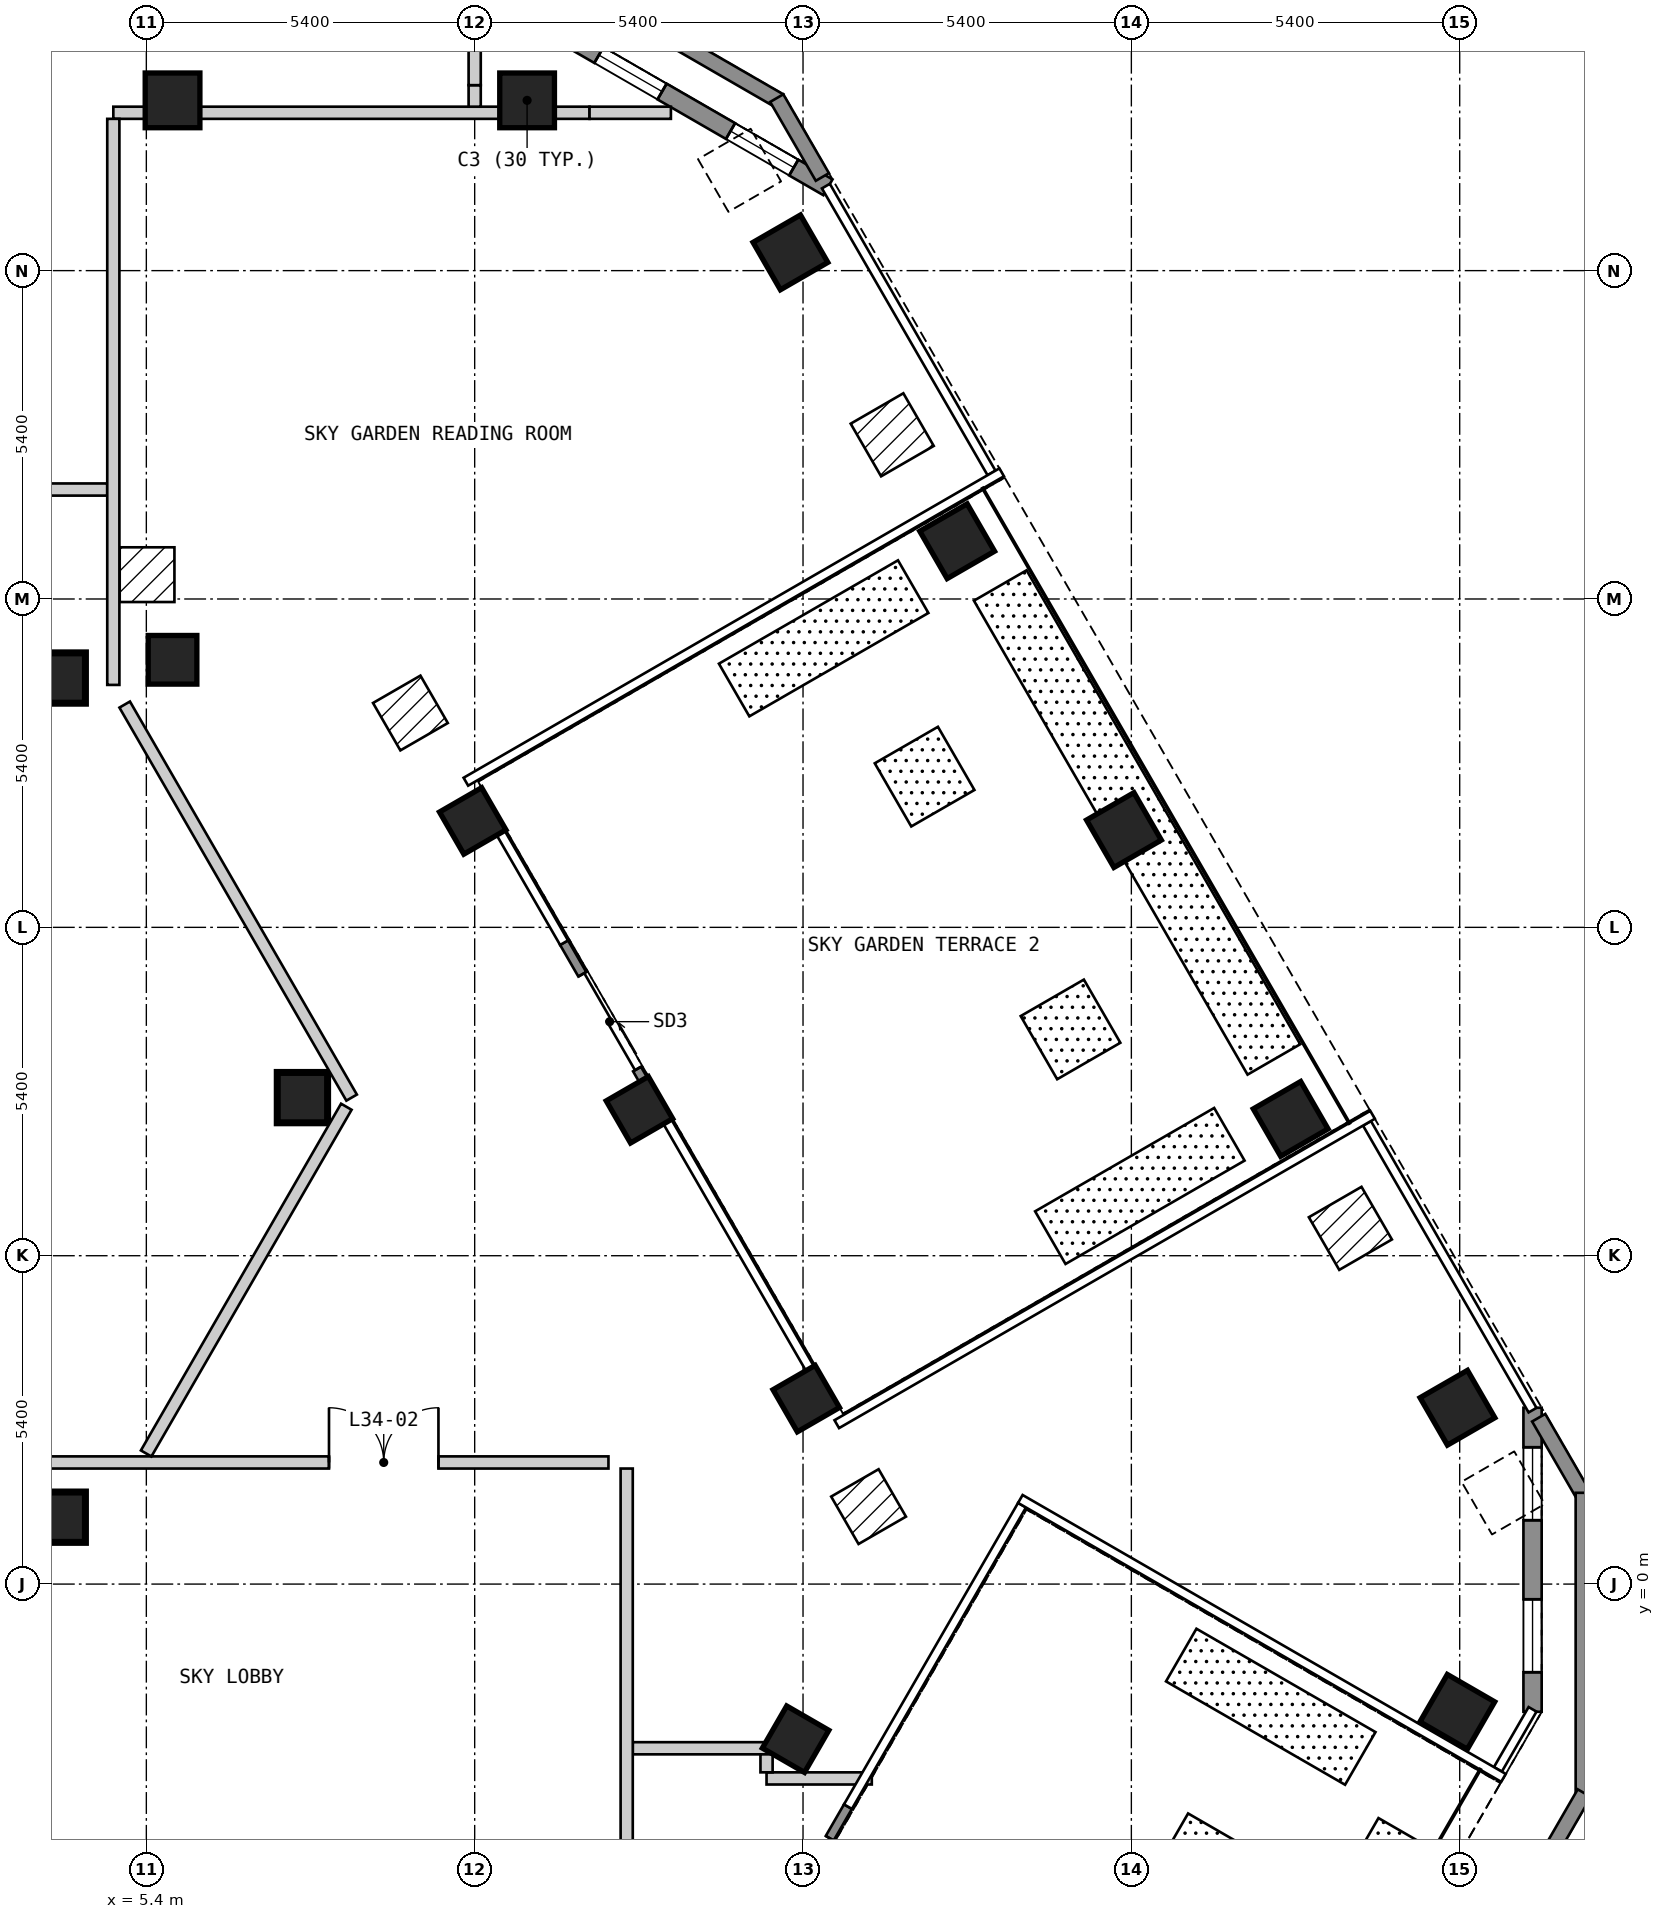
"""IFC4 building model, lengths in metres.
Left out: names, types, materials, properties, quantities, classifications, styles, units other than length and angle.
Written with IfcOpenShell. Run it as: python <this file> out.ifc"""

import sys

from ifc_helpers import new_model, si_unit, direction, frame, frame_2d, origin, origin_2d, place, context, subcontext, project, spatial, polyline, rectangle, outline, extrude, element, fill, save


model = new_model("IFC4")
c1 = context("Model", 3, precision=1e-05, world=origin(), true_north=direction((0.0, 1.0)))
c2 = subcontext(c1, "Body", "Model", "MODEL_VIEW")
j1 = project(units=[si_unit("LENGTHUNIT", "METRE"), si_unit("PLANEANGLEUNIT", "RADIAN")], contexts=[c1])
p1 = place(None, origin())
s1 = spatial("IfcSite", under=j1, at=p1, CompositionType="ELEMENT")
p2 = place(p1, origin())
s2 = spatial("IfcBuilding", under=s1, at=p2, CompositionType="ELEMENT")
p3 = place(p2, frame((0.0, 0.0, 111.6)))
s3 = spatial("IfcBuildingStorey", under=s2, at=p3, CompositionType="ELEMENT", Elevation=111.6)
for number, where, z_axis, x_axis in (
    (1, (11.662, 24.4, 0.0), (0.0, 0.0, 1.0), (-1.0, 0.0, 0.0)),
    (2, (5.831, 24.4, 0.0), (0.0, 0.0, 1.0), (-1.0, 0.0, 0.0)),
    (3, (26.961, -2.101, 0.0), (0.0, 0.0, 1.0), (0.5, 0.866, 0.0)),
    (4, (26.963, 2.9, 0.0), (0.0, 0.0, 1.0), (-0.5, 0.866, 0.0)),
    (5, (24.22, 7.65, 0.0), (0.0, 0.0, 1.0), (-0.5, 0.866, 0.0)),
    (6, (21.478, 12.4, 0.0), (0.0, 0.0, 1.0), (-0.5, 0.866, 0.0)),
    (7, (18.735, 17.15, 0.0), (0.0, 0.0, 1.0), (-0.5, 0.866, 0.0)),
    (8, (15.993, 21.9, 0.0), (0.0, 0.0, 1.0), (-0.5, 0.866, 0.0)),
):
    element("IfcColumn", number, at=place(p3, frame(where, z_axis=z_axis, x_axis=x_axis)), inside=s3, PredefinedType="COLUMN", context=c2, shape_type="SweptSolid", body=[
        extrude(rectangle(XDim=0.9, YDim=0.9, at=origin_2d()), origin(), (0.0, 0.0, 1.0), 6.0),
    ])
for number, where, z_axis, x_axis in (
    (9, (16.078, -2.551, 0.0), (0.0, 0.0, 1.0), (0.5, 0.866, 0.0)),
    (10, (16.253, 3.05, 0.0), (0.0, 0.0, 1.0), (-0.5, 0.866, 0.0)),
    (11, (3.984, 1.1, 0.0), (0.0, 0.0, 1.0), (1.0, 0.0, 0.0)),
    (12, (13.51, 7.8, 0.0), (0.0, 0.0, 1.0), (-0.5, 0.866, 0.0)),
    (13, (7.967, 8.0, 0.0), (0.0, 0.0, 1.0), (1.0, 0.0, 0.0)),
    (14, (10.768, 12.55, 0.0), (0.0, 0.0, 1.0), (-0.5, 0.866, 0.0)),
    (15, (5.831, 15.2, 0.0), (0.0, 0.0, 1.0), (-1.0, 0.0, 0.0)),
    (16, (3.984, 14.9, 0.0), (0.0, 0.0, 1.0), (1.0, 0.0, 0.0)),
):
    element("IfcColumn", number, at=place(p3, frame(where, z_axis=z_axis, x_axis=x_axis)), inside=s3, PredefinedType="COLUMN", context=c2, shape_type="SweptSolid", body=[
        extrude(rectangle(XDim=0.8, YDim=0.8, at=origin_2d()), origin(), (0.0, 0.0, 1.0), 6.0),
    ])
p4 = place(p3, frame((28.198, -2.1, 0.0), z_axis=(0.0, 0.0, 1.0), x_axis=(0.0, 1.0, 0.0)))
e17 = element("IfcWall", 17, at=p4, inside=s3, PredefinedType="SOLIDWALL", context=c2, shape_type="SweptSolid", body=[
    extrude(outline(polyline([(0.0, -0.15), (5.0, -0.15), (4.92, 0.15), (0.08, 0.15), (0.0, -0.15)])), origin(), (0.0, 0.0, 1.0), 5.7),
])
p5 = place(p4, frame((0.65, 0.0, 0.15)))
e18 = element("IfcOpeningElement", 18, at=p5, cuts=e17, PredefinedType="OPENING", context=c2, shape_type="SweptSolid", body=[
    extrude(rectangle(XDim=1.2, YDim=2.1, at=frame_2d((0.6, 1.05))), frame((0.0, 0.16, 0.0), z_axis=(0.0, -1.0, 0.0), x_axis=(1.0, 0.0, 0.0)), (0.0, 0.0, 1.0), 0.32),
])
p6 = place(p4, frame((3.15, 0.0, 0.15)))
e19 = element("IfcOpeningElement", 19, at=p6, cuts=e17, PredefinedType="OPENING", context=c2, shape_type="SweptSolid", body=[
    extrude(rectangle(XDim=1.2, YDim=2.1, at=frame_2d((0.6, 1.05))), frame((0.0, 0.16, 0.0), z_axis=(0.0, -1.0, 0.0), x_axis=(1.0, 0.0, 0.0)), (0.0, 0.0, 1.0), 0.32),
])
p7 = place(p3, frame((16.61, 22.97, 0.0), z_axis=(0.0, 0.0, 1.0), x_axis=(-0.866022959057, 0.500004234368, 0.0)))
e20 = element("IfcWall", 20, at=p7, inside=s3, PredefinedType="SOLIDWALL", context=c2, shape_type="SweptSolid", body=[
    extrude(outline(polyline([(0.0, -0.15), (5.0, -0.15), (4.92, 0.15), (0.08, 0.15), (0.0, -0.15)])), origin(), (0.0, 0.0, 1.0), 5.7),
])
p8 = place(p7, frame((0.65, 0.0, 0.15)))
e21 = element("IfcOpeningElement", 21, at=p8, cuts=e20, PredefinedType="OPENING", context=c2, shape_type="SweptSolid", body=[
    extrude(rectangle(XDim=1.2, YDim=2.1, at=frame_2d((0.6, 1.05))), frame((0.0, 0.16, 0.0), z_axis=(0.0, -1.0, 0.0), x_axis=(1.0, 0.0, 0.0)), (0.0, 0.0, 1.0), 0.32),
])
p9 = place(p7, frame((3.15, 0.0, 0.15)))
e22 = element("IfcOpeningElement", 22, at=p9, cuts=e20, PredefinedType="OPENING", context=c2, shape_type="SweptSolid", body=[
    extrude(rectangle(XDim=1.2, YDim=2.1, at=frame_2d((0.6, 1.05))), frame((0.0, 0.16, 0.0), z_axis=(0.0, -1.0, 0.0), x_axis=(1.0, 0.0, 0.0)), (0.0, 0.0, 1.0), 0.32),
])
p10 = place(p3, frame((13.77, 7.95, 0.0), z_axis=(0.0, 0.0, 1.0), x_axis=(-0.499990139034, 0.866031096941, 0.0)))
e23 = element("IfcWall", 23, at=p10, inside=s3, PredefinedType="SOLIDWALL", context=c2, shape_type="SweptSolid", body=[
    extrude(rectangle(XDim=3.0, YDim=0.15, at=frame_2d((1.5, 0.0))), origin(), (0.0, 0.0, 1.0), 5.7),
])
p11 = place(p10, frame((0.6, 0.0, 0.0)))
e24 = element("IfcOpeningElement", 24, at=p11, cuts=e23, PredefinedType="OPENING", context=c2, shape_type="SweptSolid", body=[
    extrude(rectangle(XDim=1.8, YDim=2.4, at=frame_2d((0.9, 1.2))), frame((0.0, 0.085, 0.0), z_axis=(0.0, -1.0, 0.0), x_axis=(1.0, 0.0, 0.0)), (0.0, 0.0, 1.0), 0.17),
])
p12 = place(p3, frame((15.439, -6.258, 0.0), z_axis=(0.0, 0.0, 1.0), x_axis=(0.499990139034, 0.866031096941, 0.0)))
e25 = element("IfcWall", 25, at=p12, inside=s3, PredefinedType="SOLIDWALL", context=c2, shape_type="SweptSolid", body=[
    extrude(rectangle(XDim=3.0, YDim=0.15, at=frame_2d((1.5, 0.0))), origin(), (0.0, 0.0, 1.0), 5.7),
])
p13 = place(p12, frame((0.6, 0.0, 0.0)))
e26 = element("IfcOpeningElement", 26, at=p13, cuts=e25, PredefinedType="OPENING", context=c2, shape_type="SweptSolid", body=[
    extrude(rectangle(XDim=1.8, YDim=2.4, at=frame_2d((0.9, 1.2))), frame((0.0, 0.085, 0.0), z_axis=(0.0, -1.0, 0.0), x_axis=(1.0, 0.0, 0.0)), (0.0, 0.0, 1.0), 0.17),
])
p14 = place(p3, frame((28.299, 2.736, 0.0), z_axis=(0.0, 0.0, 1.0), x_axis=(0.500272171574, -0.865868208418, 0.0)))
e27 = element("IfcWall", 27, at=p14, inside=s3, PredefinedType="PARAPET", context=c2, shape_type="SweptSolid", body=[
    extrude(outline(polyline([(0.0, -0.125), (1.432, -0.125), (1.499, 0.125), (0.0, 0.125), (0.0, -0.125)])), origin(), (0.0, 0.0, 1.0), 1.6),
])
p15 = place(p3, frame((29.032, 1.501, 0.0), z_axis=(0.0, 0.0, 1.0), x_axis=(0.0, -1.0, 0.0)))
e28 = element("IfcWall", 28, at=p15, inside=s3, PredefinedType="PARAPET", context=c2, shape_type="SweptSolid", body=[
    extrude(outline(polyline([(0.067, -0.125), (4.934, -0.125), (5.001, 0.125), (0.0, 0.125), (0.067, -0.125)])), origin(), (0.0, 0.0, 1.0), 1.6),
])
p16 = place(p3, frame((29.049, -3.438, 0.0), z_axis=(0.0, 0.0, 1.0), x_axis=(-0.500085431376, -0.865976074338, 0.0)))
e29 = element("IfcWall", 29, at=p16, inside=s3, PredefinedType="PARAPET", context=c2, shape_type="SweptSolid", body=[
    extrude(outline(polyline([(0.067, -0.125), (23.027, -0.125), (23.094, 0.125), (0.0, 0.125), (0.067, -0.125)])), origin(), (0.0, 0.0, 1.0), 1.6),
])
p17 = place(p3, frame((11.485, 26.892, 0.0), z_axis=(0.0, 0.0, 1.0), x_axis=(0.865877295069, -0.50025644412, 0.0)))
e30 = element("IfcWall", 30, at=p17, inside=s3, PredefinedType="PARAPET", context=c2, shape_type="SweptSolid", body=[
    extrude(outline(polyline([(0.067, -0.125), (4.932, -0.125), (4.999, 0.125), (0.0, 0.125), (0.067, -0.125)])), origin(), (0.0, 0.0, 1.0), 1.6),
])
p18 = place(p3, frame((15.768, 24.437, 0.0), z_axis=(0.0, 0.0, 1.0), x_axis=(0.500554469283, -0.865705044043, 0.0)))
e31 = element("IfcWall", 31, at=p18, inside=s3, PredefinedType="PARAPET", context=c2, shape_type="SweptSolid", body=[
    extrude(outline(polyline([(0.067, -0.125), (1.498, -0.125), (1.498, 0.125), (0.0, 0.125), (0.067, -0.125)])), origin(), (0.0, 0.0, 1.0), 1.6),
])
p19 = place(p3, frame((15.6, -3.196, 0.0), z_axis=(0.0, 0.0, 1.0), x_axis=(1.0, 0.0, 0.0)))
e32 = element("IfcWall", 32, at=p19, inside=s3, PredefinedType="PARTITIONING", context=c2, shape_type="SweptSolid", body=[
    extrude(rectangle(XDim=1.731, YDim=0.2, at=frame_2d((0.865, 0.0))), origin(), (0.0, 0.0, 1.0), 5.7),
])
p20 = place(p3, frame((13.4, -2.7, 0.0), z_axis=(0.0, 0.0, 1.0), x_axis=(1.0, 0.0, 0.0)))
e33 = element("IfcWall", 33, at=p20, inside=s3, PredefinedType="PARTITIONING", context=c2, shape_type="SweptSolid", body=[
    extrude(rectangle(XDim=2.3, YDim=0.2, at=frame_2d((1.15, 0.0))), origin(), (0.0, 0.0, 1.0), 5.7),
])
p21 = place(p3, frame((-12.9, 2.0, 0.0), z_axis=(0.0, 0.0, 1.0), x_axis=(1.0, 0.0, 0.0)))
e34 = element("IfcWall", 34, at=p21, inside=s3, PredefinedType="PARTITIONING", context=c2, shape_type="SweptSolid", body=[
    extrude(rectangle(XDim=25.9, YDim=0.2, at=frame_2d((12.95, 0.0))), origin(), (0.0, 0.0, 1.0), 5.7),
])
p22 = place(p21, frame((2.696, 0.0, 0.0)))
e35 = element("IfcOpeningElement", 35, at=p22, cuts=e34, PredefinedType="OPENING", context=c2, shape_type="SweptSolid", body=[
    extrude(rectangle(XDim=1.8, YDim=2.1, at=frame_2d((0.9, 1.05))), frame((0.0, 0.11, 0.0), z_axis=(0.0, -1.0, 0.0), x_axis=(1.0, 0.0, 0.0)), (0.0, 0.0, 1.0), 0.22),
])
p23 = place(p21, frame((21.304, 0.0, 0.0)))
e36 = element("IfcOpeningElement", 36, at=p23, cuts=e34, PredefinedType="OPENING", context=c2, shape_type="SweptSolid", body=[
    extrude(rectangle(XDim=1.8, YDim=2.1, at=frame_2d((0.9, 1.05))), frame((0.0, 0.11, 0.0), z_axis=(0.0, -1.0, 0.0), x_axis=(1.0, 0.0, 0.0)), (0.0, 0.0, 1.0), 0.22),
])
p24 = place(p21, frame((12.0, 0.0, 0.0)))
e37 = element("IfcOpeningElement", 37, at=p24, cuts=e34, PredefinedType="OPENING", context=c2, shape_type="SweptSolid", body=[
    extrude(rectangle(XDim=1.8, YDim=2.1, at=frame_2d((0.9, 1.05))), frame((0.0, 0.11, 0.0), z_axis=(0.0, -1.0, 0.0), x_axis=(1.0, 0.0, 0.0)), (0.0, 0.0, 1.0), 0.22),
])
p25 = place(p3, frame((-4.757, 18.0, 0.0), z_axis=(0.0, 0.0, 1.0), x_axis=(1.0, 0.0, 0.0)))
e38 = element("IfcWall", 38, at=p25, inside=s3, PredefinedType="PARTITIONING", context=c2, shape_type="SweptSolid", body=[
    extrude(rectangle(XDim=9.514, YDim=0.2, at=frame_2d((4.757, 0.0))), origin(), (0.0, 0.0, 1.0), 5.7),
])
p26 = place(p25, frame((3.857, 0.0, 0.0)))
e39 = element("IfcOpeningElement", 39, at=p26, cuts=e38, PredefinedType="OPENING", context=c2, shape_type="SweptSolid", body=[
    extrude(rectangle(XDim=1.8, YDim=2.1, at=frame_2d((0.9, 1.05))), frame((0.0, 0.11, 0.0), z_axis=(0.0, -1.0, 0.0), x_axis=(1.0, 0.0, 0.0)), (0.0, 0.0, 1.0), 0.22),
])
p27 = place(p3, frame((4.857, 24.196, 0.0), z_axis=(0.0, 0.0, 1.0), x_axis=(1.0, 0.0, 0.0)))
e40 = element("IfcWall", 40, at=p27, inside=s3, PredefinedType="PARTITIONING", context=c2, shape_type="SweptSolid", body=[
    extrude(rectangle(XDim=1.074, YDim=0.2, at=frame_2d((0.537, 0.0))), origin(), (0.0, 0.0, 1.0), 5.07),
])
p28 = place(p3, frame((5.831, 24.196, 0.0), z_axis=(0.0, 0.0, 1.0), x_axis=(1.0, 0.0, 0.0)))
e41 = element("IfcWall", 41, at=p28, inside=s3, PredefinedType="PARTITIONING", context=c2, shape_type="SweptSolid", body=[
    extrude(rectangle(XDim=5.706, YDim=0.2, at=frame_2d((2.853, 0.0))), origin(), (0.0, 0.0, 1.0), 5.07),
])
p29 = place(p3, frame((11.537, 24.196, 0.0), z_axis=(0.0, 0.0, 1.0), x_axis=(1.0, 0.0, 0.0)))
e42 = element("IfcWall", 42, at=p29, inside=s3, PredefinedType="PARTITIONING", context=c2, shape_type="SweptSolid", body=[
    extrude(rectangle(XDim=0.125, YDim=0.2, at=frame_2d((0.062, 0.0))), origin(), (0.0, 0.0, 1.0), 5.07),
])
p30 = place(p3, frame((11.662, 24.196, 0.0), z_axis=(0.0, 0.0, 1.0), x_axis=(1.0, 0.0, 0.0)))
e43 = element("IfcWall", 43, at=p30, inside=s3, PredefinedType="PARTITIONING", context=c2, shape_type="SweptSolid", body=[
    extrude(rectangle(XDim=1.027, YDim=0.2, at=frame_2d((0.513, 0.0))), origin(), (0.0, 0.0, 1.0), 5.07),
])
p31 = place(p3, frame((12.689, 24.196, 0.0), z_axis=(0.0, 0.0, 1.0), x_axis=(1.0, 0.0, 0.0)))
e44 = element("IfcWall", 44, at=p31, inside=s3, PredefinedType="PARTITIONING", context=c2, shape_type="SweptSolid", body=[
    extrude(rectangle(XDim=1.338, YDim=0.2, at=frame_2d((0.669, 0.0))), origin(), (0.0, 0.0, 1.0), 5.7),
])
p32 = place(p3, frame((4.857, 14.787, 0.0), z_axis=(0.0, 0.0, 1.0), x_axis=(0.0, 1.0, 0.0)))
e45 = element("IfcWall", 45, at=p32, inside=s3, PredefinedType="PARTITIONING", context=c2, shape_type="SweptSolid", body=[
    extrude(rectangle(XDim=9.309, YDim=0.2, at=frame_2d((4.654, 0.0))), origin(), (0.0, 0.0, 1.0), 5.7),
])
p33 = place(p3, frame((10.8, 24.296, 0.0), z_axis=(0.0, 0.0, 1.0), x_axis=(0.0, 1.0, 0.0)))
e46 = element("IfcWall", 46, at=p33, inside=s3, PredefinedType="PARTITIONING", context=c2, shape_type="SweptSolid", body=[
    extrude(rectangle(XDim=0.354, YDim=0.2, at=frame_2d((0.177, 0.0))), origin(), (0.0, 0.0, 1.0), 5.07),
])
p34 = place(p3, frame((10.8, 24.65, 0.0), z_axis=(0.0, 0.0, 1.0), x_axis=(0.0, 1.0, 0.0)))
e47 = element("IfcWall", 47, at=p34, inside=s3, PredefinedType="PARTITIONING", context=c2, shape_type="SweptSolid", body=[
    extrude(rectangle(XDim=0.57, YDim=0.2, at=frame_2d((0.285, 0.0))), origin(), (0.0, 0.0, 1.0), 5.7),
])
p35 = place(p3, frame((13.3, -4.88, 0.0), z_axis=(0.0, 0.0, 1.0), x_axis=(0.0, 1.0, 0.0)))
e48 = element("IfcWall", 48, at=p35, inside=s3, PredefinedType="PARTITIONING", context=c2, shape_type="SweptSolid", body=[
    extrude(rectangle(XDim=6.78, YDim=0.2, at=frame_2d((3.39, 0.0))), origin(), (0.0, 0.0, 1.0), 5.7),
])
p36 = place(p3, frame((15.6, -3.096, 0.0), z_axis=(0.0, 0.0, 1.0), x_axis=(0.0, 1.0, 0.0)))
e49 = element("IfcWall", 49, at=p36, inside=s3, PredefinedType="PARTITIONING", context=c2, shape_type="SweptSolid", body=[
    extrude(rectangle(XDim=0.296, YDim=0.2, at=frame_2d((0.148, 0.0))), origin(), (0.0, 0.0, 1.0), 5.7),
])
p37 = place(p3, frame((5.044, 14.464, 0.0), z_axis=(0.0, 0.0, 1.0), x_axis=(0.499987658634, -0.866032528958, 0.0)))
e50 = element("IfcWall", 50, at=p37, inside=s3, PredefinedType="PARTITIONING", context=c2, shape_type="SweptSolid", body=[
    extrude(rectangle(XDim=7.464, YDim=0.2, at=frame_2d((3.732, 0.0))), origin(), (0.0, 0.0, 1.0), 5.7),
])
p38 = place(p3, frame((5.397, 2.148, 0.0), z_axis=(0.0, 0.0, 1.0), x_axis=(0.499983511822, 0.866034923029, 0.0)))
e51 = element("IfcWall", 51, at=p38, inside=s3, PredefinedType="PARTITIONING", context=c2, shape_type="SweptSolid", body=[
    extrude(rectangle(XDim=6.584, YDim=0.2, at=frame_2d((3.292, 0.0))), origin(), (0.0, 0.0, 1.0), 5.7),
])
p39 = place(p5, origin())
e52 = element("IfcWindow", 52, at=p39, inside=s3, PartitioningType="SINGLE_PANEL", PredefinedType="WINDOW", context=c2, shape_type="SweptSolid", body=[
    extrude(rectangle(XDim=1.2, YDim=2.1, at=frame_2d((0.6, 1.05))), frame((0.0, 0.03, 0.0), z_axis=(0.0, -1.0, 0.0), x_axis=(1.0, 0.0, 0.0)), (0.0, 0.0, 1.0), 0.06),
])
fill(e18, e52)
p40 = place(p6, origin())
e53 = element("IfcWindow", 53, at=p40, inside=s3, PartitioningType="SINGLE_PANEL", PredefinedType="WINDOW", context=c2, shape_type="SweptSolid", body=[
    extrude(rectangle(XDim=1.2, YDim=2.1, at=frame_2d((0.6, 1.05))), frame((0.0, 0.03, 0.0), z_axis=(0.0, -1.0, 0.0), x_axis=(1.0, 0.0, 0.0)), (0.0, 0.0, 1.0), 0.06),
])
fill(e19, e53)
p41 = place(p8, origin())
e54 = element("IfcWindow", 54, at=p41, inside=s3, PartitioningType="SINGLE_PANEL", PredefinedType="WINDOW", context=c2, shape_type="SweptSolid", body=[
    extrude(rectangle(XDim=1.2, YDim=2.1, at=frame_2d((0.6, 1.05))), frame((0.0, 0.03, 0.0), z_axis=(0.0, -1.0, 0.0), x_axis=(1.0, 0.0, 0.0)), (0.0, 0.0, 1.0), 0.06),
])
fill(e21, e54)
p42 = place(p9, origin())
e55 = element("IfcWindow", 55, at=p42, inside=s3, PartitioningType="SINGLE_PANEL", PredefinedType="WINDOW", context=c2, shape_type="SweptSolid", body=[
    extrude(rectangle(XDim=1.2, YDim=2.1, at=frame_2d((0.6, 1.05))), frame((0.0, 0.03, 0.0), z_axis=(0.0, -1.0, 0.0), x_axis=(1.0, 0.0, 0.0)), (0.0, 0.0, 1.0), 0.06),
])
fill(e22, e55)
p43 = place(p11, origin())
e56 = element("IfcDoor", 56, at=p43, inside=s3, OperationType="SLIDING_TO_LEFT", PredefinedType="DOOR", context=c2, shape_type="SweptSolid", body=[
    extrude(rectangle(XDim=1.8, YDim=2.4, at=frame_2d((0.9, 1.2))), frame((0.0, 0.025, 0.0), z_axis=(0.0, -1.0, 0.0), x_axis=(1.0, 0.0, 0.0)), (0.0, 0.0, 1.0), 0.05),
])
fill(e24, e56)
p44 = place(p13, origin())
e57 = element("IfcDoor", 57, at=p44, inside=s3, OperationType="SLIDING_TO_LEFT", PredefinedType="DOOR", context=c2, shape_type="SweptSolid", body=[
    extrude(rectangle(XDim=1.8, YDim=2.4, at=frame_2d((0.9, 1.2))), frame((0.0, 0.025, 0.0), z_axis=(0.0, -1.0, 0.0), x_axis=(1.0, 0.0, 0.0)), (0.0, 0.0, 1.0), 0.05),
])
fill(e26, e57)
p45 = place(p23, origin())
e58 = element("IfcDoor", 58, at=p45, inside=s3, OperationType="DOUBLE_DOOR_SINGLE_SWING", PredefinedType="DOOR", context=c2, shape_type="SweptSolid", body=[
    extrude(rectangle(XDim=1.8, YDim=2.1, at=frame_2d((0.9, 1.05))), frame((0.0, 0.025, 0.0), z_axis=(0.0, -1.0, 0.0), x_axis=(1.0, 0.0, 0.0)), (0.0, 0.0, 1.0), 0.05),
])
fill(e36, e58)
save(model, sys.argv[1])
